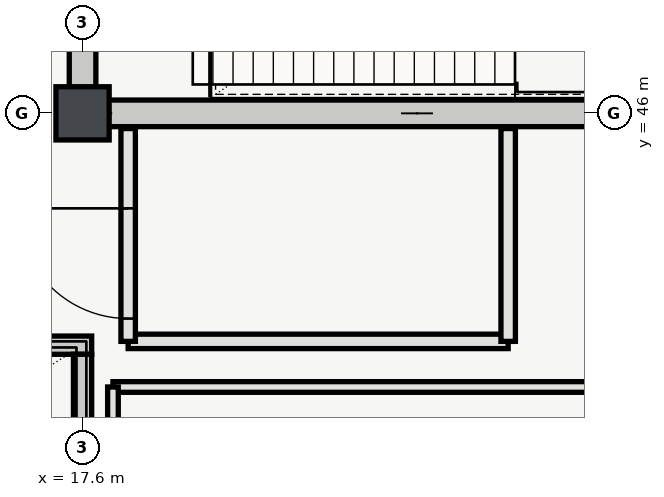
"""IFC4 building model, lengths in metres.
Left out: names, types, materials, properties, quantities, classifications, styles, units other than length and angle.
Written with IfcOpenShell. Run it as: python <this file> out.ifc"""

import sys

from ifc_helpers import new_model, si_unit, direction, frame, frame_2d, origin, origin_2d, place, context, subcontext, project, spatial, rectangle, extrude, element, fill, save


model = new_model("IFC4")
c1 = context("Model", 3, precision=1e-05, world=origin(), true_north=direction((0.0, 1.0)))
c2 = subcontext(c1, "Body", "Model", "MODEL_VIEW")
j1 = project(units=[si_unit("LENGTHUNIT", "METRE"), si_unit("PLANEANGLEUNIT", "RADIAN")], contexts=[c1])
p1 = place(None, origin())
s1 = spatial("IfcSite", under=j1, at=p1, CompositionType="ELEMENT")
p2 = place(p1, origin())
s2 = spatial("IfcBuilding", under=s1, at=p2, CompositionType="ELEMENT")
p3 = place(p2, frame((0.0, 0.0, 5.4)))
s3 = spatial("IfcBuildingStorey", under=s2, at=p3, CompositionType="ELEMENT", Elevation=5.4)
p4 = place(p3, frame((17.6, 46.0, 0.0), z_axis=(0.0, 0.0, 1.0), x_axis=(1.0, 0.0, 0.0)))
e1 = element("IfcColumn", 1, at=p4, inside=s3, PredefinedType="COLUMN", context=c2, shape_type="SweptSolid", body=[
    extrude(rectangle(XDim=0.7, YDim=0.7, at=origin_2d()), origin(), (0.0, 0.0, 1.0), 5.4),
])
p5 = place(p3, frame((17.425, 46.0, 0.0), z_axis=(0.0, 0.0, 1.0), x_axis=(1.0, 0.0, 0.0)))
e2 = element("IfcWall", 2, at=p5, inside=s3, PredefinedType="SHEAR", context=c2, shape_type="SweptSolid", body=[
    extrude(rectangle(XDim=9.15, YDim=0.35, at=frame_2d((4.575, 0.0))), origin(), (0.0, 0.0, 1.0), 5.12),
])
p6 = place(p3, frame((17.6, 46.175, 0.0), z_axis=(0.0, 0.0, 1.0), x_axis=(0.0, 1.0, 0.0)))
e3 = element("IfcWall", 3, at=p6, inside=s3, PredefinedType="SHEAR", context=c2, shape_type="SweptSolid", body=[
    extrude(rectangle(XDim=7.65, YDim=0.35, at=frame_2d((3.825, 0.0))), origin(), (0.0, 0.0, 1.0), 5.12),
])
p7 = place(p6, frame((1.625, 0.0, 0.0)))
e4 = element("IfcOpeningElement", 4, at=p7, cuts=e3, PredefinedType="OPENING", context=c2, shape_type="SweptSolid", body=[
    extrude(rectangle(XDim=1.4, YDim=2.2, at=frame_2d((0.7, 1.1))), frame((0.0, 0.185, 0.0), z_axis=(0.0, -1.0, 0.0), x_axis=(1.0, 0.0, 0.0)), (0.0, 0.0, 1.0), 0.37),
])
p8 = place(p3, frame((18.2, 43.0, 0.0), z_axis=(0.0, 0.0, 1.0), x_axis=(1.0, 0.0, 0.0)))
e5 = element("IfcWall", 5, at=p8, inside=s3, PredefinedType="PARTITIONING", context=c2, shape_type="SweptSolid", body=[
    extrude(rectangle(XDim=5.0, YDim=0.19, at=frame_2d((2.5, 0.0))), origin(), (0.0, 0.0, 1.0), 5.12),
])
p9 = place(p3, frame((18.2, 45.8, 0.0), z_axis=(0.0, 0.0, 1.0), x_axis=(0.0, -1.0, 0.0)))
e6 = element("IfcWall", 6, at=p9, inside=s3, PredefinedType="PARTITIONING", context=c2, shape_type="SweptSolid", body=[
    extrude(rectangle(XDim=2.8, YDim=0.19, at=frame_2d((1.4, 0.0))), origin(), (0.0, 0.0, 1.0), 5.12),
])
p10 = place(p9, frame((1.05, 0.0, 0.0)))
e7 = element("IfcOpeningElement", 7, at=p10, cuts=e6, PredefinedType="OPENING", context=c2, shape_type="SweptSolid", body=[
    extrude(rectangle(XDim=1.45, YDim=2.2, at=frame_2d((0.725, 1.1))), frame((0.0, 0.105, 0.0), z_axis=(0.0, -1.0, 0.0), x_axis=(1.0, 0.0, 0.0)), (0.0, 0.0, 1.0), 0.21),
])
p11 = place(p3, frame((23.2, 43.0, 0.0), z_axis=(0.0, 0.0, 1.0), x_axis=(0.0, 1.0, 0.0)))
e8 = element("IfcWall", 8, at=p11, inside=s3, PredefinedType="PARTITIONING", context=c2, shape_type="SweptSolid", body=[
    extrude(rectangle(XDim=2.8, YDim=0.19, at=frame_2d((1.4, 0.0))), origin(), (0.0, 0.0, 1.0), 5.12),
])
p12 = place(p3, frame((27.4, 42.4, 0.0), z_axis=(0.0, 0.0, 1.0), x_axis=(-1.0, 0.0, 0.0)))
e9 = element("IfcWall", 9, at=p12, inside=s3, PredefinedType="PARTITIONING", context=c2, shape_type="SweptSolid", body=[
    extrude(rectangle(XDim=9.4, YDim=0.14, at=frame_2d((4.7, 0.0))), origin(), (0.0, 0.0, 1.0), 5.12),
])
p13 = place(p3, frame((18.0, 42.4, 0.0), z_axis=(0.0, 0.0, 1.0), x_axis=(0.0, -1.0, 0.0)))
e10 = element("IfcWall", 10, at=p13, inside=s3, PredefinedType="PARTITIONING", context=c2, shape_type="SweptSolid", body=[
    extrude(rectangle(XDim=11.6, YDim=0.14, at=frame_2d((5.8, 0.0))), origin(), (0.0, 0.0, 1.0), 5.12),
])
p14 = place(p3, frame((17.72, 42.95, 0.0), z_axis=(0.0, 0.0, 1.0), x_axis=(-1.0, 0.0, 0.0)))
e11 = element("IfcWall", 11, at=p14, inside=s3, PredefinedType="SHEAR", context=c2, shape_type="SweptSolid", body=[
    extrude(rectangle(XDim=9.04, YDim=0.24, at=frame_2d((4.52, 0.0))), origin(), (0.0, 0.0, 1.0), 5.12),
])
p15 = place(p3, frame((17.6, 38.67, 0.0), z_axis=(0.0, 0.0, 1.0), x_axis=(0.0, 1.0, 0.0)))
e12 = element("IfcWall", 12, at=p15, inside=s3, PredefinedType="SHEAR", context=c2, shape_type="SweptSolid", body=[
    extrude(rectangle(XDim=4.16, YDim=0.24, at=frame_2d((2.08, 0.0))), origin(), (0.0, 0.0, 1.0), 5.12),
])
p16 = place(p10, origin())
e13 = element("IfcDoor", 13, at=p16, inside=s3, OperationType="SINGLE_SWING_LEFT", PredefinedType="DOOR", context=c2, shape_type="SweptSolid", body=[
    extrude(rectangle(XDim=1.45, YDim=2.2, at=frame_2d((0.725, 1.1))), frame((0.0, 0.025, 0.0), z_axis=(0.0, -1.0, 0.0), x_axis=(1.0, 0.0, 0.0)), (0.0, 0.0, 1.0), 0.05),
])
fill(e7, e13)
save(model, sys.argv[1])
